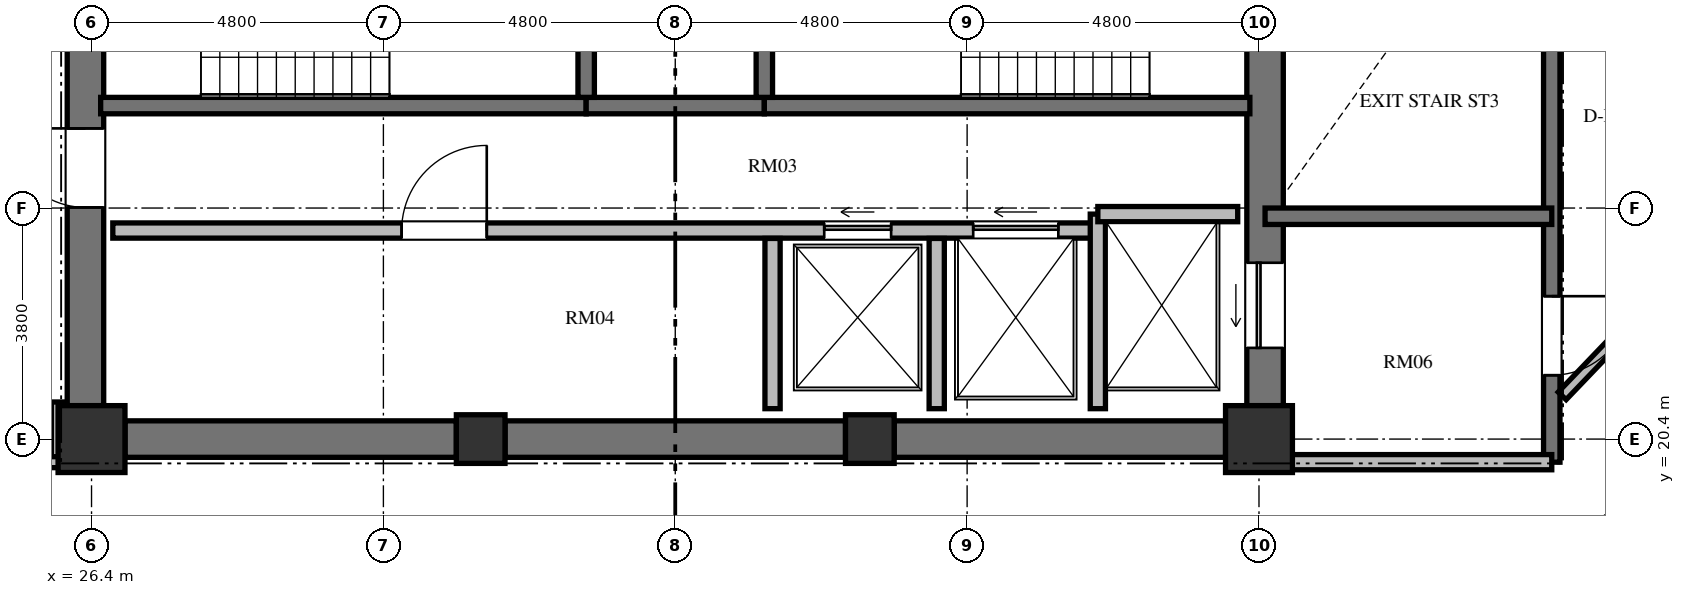
"""IFC4 building model, lengths in metres.
Left out: names, types, materials, properties, quantities, classifications, styles, units other than length and angle.
Written with IfcOpenShell. Run it as: python <this file> out.ifc"""

import sys

from ifc_helpers import new_model, si_unit, direction, frame, frame_2d, origin, origin_2d, place, context, subcontext, project, spatial, rectangle, extrude, element, fill, save


model = new_model("IFC4")
c1 = context("Model", 3, precision=1e-05, world=origin(), true_north=direction((0.0, 1.0)))
c2 = subcontext(c1, "Body", "Model", "MODEL_VIEW")
j1 = project(units=[si_unit("LENGTHUNIT", "METRE"), si_unit("PLANEANGLEUNIT", "RADIAN")], contexts=[c1])
p1 = place(None, origin())
s1 = spatial("IfcSite", under=j1, at=p1, CompositionType="ELEMENT")
p2 = place(p1, origin())
s2 = spatial("IfcBuilding", under=s1, at=p2, CompositionType="ELEMENT")
p3 = place(p2, frame((0.0, 0.0, 194.832)))
s3 = spatial("IfcBuildingStorey", under=s2, at=p3, CompositionType="ELEMENT", Elevation=194.832)
p4 = place(p3, frame((26.4, 20.4, 0.0), z_axis=(0.0, 0.0, 1.0), x_axis=(1.0, 0.0, 0.0)))
e1 = element("IfcColumn", 1, at=p4, inside=s3, PredefinedType="COLUMN", context=c2, shape_type="SweptSolid", body=[
    extrude(rectangle(XDim=1.1, YDim=1.1, at=origin_2d()), origin(), (0.0, 0.0, 1.0), 3.648),
])
for number, where, z_axis, x_axis in (
    (2, (32.8, 20.4, 0.0), (0.0, 0.0, 1.0), (1.0, 0.0, 0.0)),
    (3, (39.2, 20.4, 0.0), (0.0, 0.0, 1.0), (1.0, 0.0, 0.0)),
):
    element("IfcColumn", number, at=place(p3, frame(where, z_axis=z_axis, x_axis=x_axis)), inside=s3, PredefinedType="COLUMN", context=c2, shape_type="SweptSolid", body=[
        extrude(rectangle(XDim=0.8, YDim=0.8, at=origin_2d()), origin(), (0.0, 0.0, 1.0), 3.648),
    ])
p5 = place(p3, frame((45.6, 20.4, 0.0), z_axis=(0.0, 0.0, 1.0), x_axis=(1.0, 0.0, 0.0)))
e4 = element("IfcColumn", 4, at=p5, inside=s3, PredefinedType="COLUMN", context=c2, shape_type="SweptSolid", body=[
    extrude(rectangle(XDim=1.1, YDim=1.1, at=origin_2d()), origin(), (0.0, 0.0, 1.0), 3.648),
])
p6 = place(p3, frame((26.3, 20.95, 0.0), z_axis=(0.0, 0.0, 1.0), x_axis=(0.0, 1.0, 0.0)))
e5 = element("IfcWall", 5, at=p6, inside=s3, PredefinedType="SHEAR", context=c2, shape_type="SweptSolid", body=[
    extrude(rectangle(XDim=14.1, YDim=0.6, at=frame_2d((7.05, 0.0))), origin(), (0.0, 0.0, 1.0), 3.648),
])
p7 = place(p6, frame((6.5, 0.0, 0.0)))
e6 = element("IfcOpeningElement", 6, at=p7, cuts=e5, PredefinedType="OPENING", context=c2, shape_type="SweptSolid", body=[
    extrude(rectangle(XDim=1.2, YDim=2.15, at=frame_2d((0.6, 1.075))), frame((0.0, 0.31, 0.0), z_axis=(0.0, -1.0, 0.0), x_axis=(1.0, 0.0, 0.0)), (0.0, 0.0, 1.0), 0.62),
])
p8 = place(p6, frame((9.6, 0.0, 0.0)))
e7 = element("IfcOpeningElement", 7, at=p8, cuts=e5, PredefinedType="OPENING", context=c2, shape_type="SweptSolid", body=[
    extrude(rectangle(XDim=1.3, YDim=2.2, at=frame_2d((0.65, 1.1))), frame((0.0, 0.31, 0.0), z_axis=(0.0, -1.0, 0.0), x_axis=(1.0, 0.0, 0.0)), (0.0, 0.0, 1.0), 0.62),
])
p9 = place(p6, frame((3.26, 0.0, 0.0)))
e8 = element("IfcOpeningElement", 8, at=p9, cuts=e5, PredefinedType="OPENING", context=c2, shape_type="SweptSolid", body=[
    extrude(rectangle(XDim=1.3, YDim=2.2, at=frame_2d((0.65, 1.1))), frame((0.0, 0.31, 0.0), z_axis=(0.0, -1.0, 0.0), x_axis=(1.0, 0.0, 0.0)), (0.0, 0.0, 1.0), 0.62),
])
p10 = place(p3, frame((45.7, 20.95, 0.0), z_axis=(0.0, 0.0, 1.0), x_axis=(0.0, 1.0, 0.0)))
e9 = element("IfcWall", 9, at=p10, inside=s3, PredefinedType="SHEAR", context=c2, shape_type="SweptSolid", body=[
    extrude(rectangle(XDim=14.1, YDim=0.6, at=frame_2d((7.05, 0.0))), origin(), (0.0, 0.0, 1.0), 3.648),
])
p11 = place(p10, frame((11.75, 0.0, 0.0)))
e10 = element("IfcOpeningElement", 10, at=p11, cuts=e9, PredefinedType="OPENING", context=c2, shape_type="SweptSolid", body=[
    extrude(rectangle(XDim=1.4, YDim=2.3, at=frame_2d((0.7, 1.15))), frame((0.0, 0.31, 0.0), z_axis=(0.0, -1.0, 0.0), x_axis=(1.0, 0.0, 0.0)), (0.0, 0.0, 1.0), 0.62),
])
p12 = place(p10, frame((0.95, 0.0, 0.0)))
e11 = element("IfcOpeningElement", 11, at=p12, cuts=e9, PredefinedType="OPENING", context=c2, shape_type="SweptSolid", body=[
    extrude(rectangle(XDim=1.4, YDim=2.3, at=frame_2d((0.7, 1.15))), frame((0.0, 0.31, 0.0), z_axis=(0.0, -1.0, 0.0), x_axis=(1.0, 0.0, 0.0)), (0.0, 0.0, 1.0), 0.62),
])
p13 = place(p3, frame((26.95, 20.4, 0.0), z_axis=(0.0, 0.0, 1.0), x_axis=(1.0, 0.0, 0.0)))
e12 = element("IfcWall", 12, at=p13, inside=s3, PredefinedType="SHEAR", context=c2, shape_type="SweptSolid", body=[
    extrude(rectangle(XDim=5.45, YDim=0.6, at=frame_2d((2.725, 0.0))), origin(), (0.0, 0.0, 1.0), 3.648),
])
p14 = place(p3, frame((33.2, 20.4, 0.0), z_axis=(0.0, 0.0, 1.0), x_axis=(1.0, 0.0, 0.0)))
e13 = element("IfcWall", 13, at=p14, inside=s3, PredefinedType="SHEAR", context=c2, shape_type="SweptSolid", body=[
    extrude(rectangle(XDim=5.6, YDim=0.6, at=frame_2d((2.8, 0.0))), origin(), (0.0, 0.0, 1.0), 3.648),
])
p15 = place(p3, frame((39.6, 20.4, 0.0), z_axis=(0.0, 0.0, 1.0), x_axis=(1.0, 0.0, 0.0)))
e14 = element("IfcWall", 14, at=p15, inside=s3, PredefinedType="SHEAR", context=c2, shape_type="SweptSolid", body=[
    extrude(rectangle(XDim=5.45, YDim=0.6, at=frame_2d((2.725, 0.0))), origin(), (0.0, 0.0, 1.0), 3.648),
])
p16 = place(p3, frame((26.55, 25.885, 0.0), z_axis=(0.0, 0.0, 1.0), x_axis=(1.0, 0.0, 0.0)))
e15 = element("IfcWall", 15, at=p16, inside=s3, PredefinedType="SHEAR", context=c2, shape_type="SweptSolid", body=[
    extrude(rectangle(XDim=7.985, YDim=0.27, at=frame_2d((3.992, 0.0))), origin(), (0.0, 0.0, 1.0), 3.648),
])
p17 = place(p3, frame((34.535, 25.885, 0.0), z_axis=(0.0, 0.0, 1.0), x_axis=(1.0, 0.0, 0.0)))
e16 = element("IfcWall", 16, at=p17, inside=s3, PredefinedType="SHEAR", context=c2, shape_type="SweptSolid", body=[
    extrude(rectangle(XDim=2.93, YDim=0.27, at=frame_2d((1.465, 0.0))), origin(), (0.0, 0.0, 1.0), 3.648),
])
p18 = place(p3, frame((37.465, 25.885, 0.0), z_axis=(0.0, 0.0, 1.0), x_axis=(1.0, 0.0, 0.0)))
e17 = element("IfcWall", 17, at=p18, inside=s3, PredefinedType="SHEAR", context=c2, shape_type="SweptSolid", body=[
    extrude(rectangle(XDim=7.985, YDim=0.27, at=frame_2d((3.992, 0.0))), origin(), (0.0, 0.0, 1.0), 3.648),
])
for number, where, z_axis, x_axis in (
    (18, (34.535, 26.02, 0.0), (0.0, 0.0, 1.0), (0.0, 1.0, 0.0)),
    (19, (37.465, 26.02, 0.0), (0.0, 0.0, 1.0), (0.0, 1.0, 0.0)),
):
    element("IfcWall", number, at=place(p3, frame(where, z_axis=z_axis, x_axis=x_axis)), inside=s3, PredefinedType="SHEAR", context=c2, shape_type="SweptSolid", body=[
        extrude(rectangle(XDim=4.08, YDim=0.27, at=frame_2d((2.04, 0.0))), origin(), (0.0, 0.0, 1.0), 3.648),
    ])
p19 = place(p3, frame((26.75, 23.83, 0.0), z_axis=(0.0, 0.0, 1.0), x_axis=(1.0, 0.0, 0.0)))
e20 = element("IfcWall", 20, at=p19, inside=s3, PredefinedType="SOLIDWALL", context=c2, shape_type="SweptSolid", body=[
    extrude(rectangle(XDim=16.2, YDim=0.25, at=frame_2d((8.1, 0.0))), origin(), (0.0, 0.0, 1.0), 3.448),
])
p20 = place(p19, frame((4.75, 0.0, 0.0)))
e21 = element("IfcOpeningElement", 21, at=p20, cuts=e20, PredefinedType="OPENING", context=c2, shape_type="SweptSolid", body=[
    extrude(rectangle(XDim=1.4, YDim=2.2, at=frame_2d((0.7, 1.1))), frame((0.0, 0.135, 0.0), z_axis=(0.0, -1.0, 0.0), x_axis=(1.0, 0.0, 0.0)), (0.0, 0.0, 1.0), 0.27),
])
p21 = place(p19, frame((11.7, 0.0, 0.0)))
e22 = element("IfcOpeningElement", 22, at=p21, cuts=e20, PredefinedType="OPENING", context=c2, shape_type="SweptSolid", body=[
    extrude(rectangle(XDim=1.1, YDim=2.2, at=frame_2d((0.55, 1.1))), frame((0.0, 0.135, 0.0), z_axis=(0.0, -1.0, 0.0), x_axis=(1.0, 0.0, 0.0)), (0.0, 0.0, 1.0), 0.27),
])
p22 = place(p19, frame((14.15, 0.0, 0.0)))
e23 = element("IfcOpeningElement", 23, at=p22, cuts=e20, PredefinedType="OPENING", context=c2, shape_type="SweptSolid", body=[
    extrude(rectangle(XDim=1.4, YDim=2.3, at=frame_2d((0.7, 1.15))), frame((0.0, 0.135, 0.0), z_axis=(0.0, -1.0, 0.0), x_axis=(1.0, 0.0, 0.0)), (0.0, 0.0, 1.0), 0.27),
])
p23 = place(p3, frame((42.95, 20.9, 0.0), z_axis=(0.0, 0.0, 1.0), x_axis=(0.0, 1.0, 0.0)))
e24 = element("IfcWall", 24, at=p23, inside=s3, PredefinedType="SOLIDWALL", context=c2, shape_type="SweptSolid", body=[
    extrude(rectangle(XDim=3.2, YDim=0.25, at=frame_2d((1.6, 0.0))), origin(), (0.0, 0.0, 1.0), 3.448),
])
p24 = place(p3, frame((42.95, 24.1, 0.0), z_axis=(0.0, 0.0, 1.0), x_axis=(1.0, 0.0, 0.0)))
e25 = element("IfcWall", 25, at=p24, inside=s3, PredefinedType="SOLIDWALL", context=c2, shape_type="SweptSolid", body=[
    extrude(rectangle(XDim=2.3, YDim=0.25, at=frame_2d((1.15, 0.0))), origin(), (0.0, 0.0, 1.0), 3.448),
])
for number, where, z_axis, x_axis in (
    (26, (37.6, 20.9, 0.0), (0.0, 0.0, 1.0), (0.0, 1.0, 0.0)),
    (27, (40.3, 20.9, 0.0), (0.0, 0.0, 1.0), (0.0, 1.0, 0.0)),
):
    element("IfcWall", number, at=place(p3, frame(where, z_axis=z_axis, x_axis=x_axis)), inside=s3, PredefinedType="SOLIDWALL", context=c2, shape_type="SweptSolid", body=[
        extrude(rectangle(XDim=2.8, YDim=0.25, at=frame_2d((1.4, 0.0))), origin(), (0.0, 0.0, 1.0), 3.448),
    ])
p25 = place(p3, frame((50.415, 35.845, 0.0), z_axis=(0.0, 0.0, 1.0), x_axis=(0.0, -1.0, 0.0)))
e28 = element("IfcWall", 28, at=p25, inside=s3, PredefinedType="SHEAR", context=c2, shape_type="SweptSolid", body=[
    extrude(rectangle(XDim=15.825, YDim=0.27, at=frame_2d((7.913, 0.0))), origin(), (0.0, 0.0, 1.0), 3.648),
])
p26 = place(p25, frame((4.445, 0.0, 0.0)))
e29 = element("IfcOpeningElement", 29, at=p26, cuts=e28, PredefinedType="OPENING", context=c2, shape_type="SweptSolid", body=[
    extrude(rectangle(XDim=1.2, YDim=2.15, at=frame_2d((0.6, 1.075))), frame((0.0, 0.145, 0.0), z_axis=(0.0, -1.0, 0.0), x_axis=(1.0, 0.0, 0.0)), (0.0, 0.0, 1.0), 0.29),
])
p27 = place(p25, frame((1.295, 0.0, 0.0)))
e30 = element("IfcOpeningElement", 30, at=p27, cuts=e28, PredefinedType="OPENING", context=c2, shape_type="SweptSolid", body=[
    extrude(rectangle(XDim=1.3, YDim=2.2, at=frame_2d((0.65, 1.1))), frame((0.0, 0.145, 0.0), z_axis=(0.0, -1.0, 0.0), x_axis=(1.0, 0.0, 0.0)), (0.0, 0.0, 1.0), 0.29),
])
p28 = place(p25, frame((13.095, 0.0, 0.0)))
e31 = element("IfcOpeningElement", 31, at=p28, cuts=e28, PredefinedType="OPENING", context=c2, shape_type="SweptSolid", body=[
    extrude(rectangle(XDim=1.3, YDim=2.2, at=frame_2d((0.65, 1.1))), frame((0.0, 0.145, 0.0), z_axis=(0.0, -1.0, 0.0), x_axis=(1.0, 0.0, 0.0)), (0.0, 0.0, 1.0), 0.29),
])
p29 = place(p3, frame((45.7, 24.065, 0.0), z_axis=(0.0, 0.0, 1.0), x_axis=(1.0, 0.0, 0.0)))
e32 = element("IfcWall", 32, at=p29, inside=s3, PredefinedType="SHEAR", context=c2, shape_type="SweptSolid", body=[
    extrude(rectangle(XDim=4.715, YDim=0.27, at=frame_2d((2.357, 0.0))), origin(), (0.0, 0.0, 1.0), 3.648),
])
p30 = place(p3, frame((45.7, 20.02, 0.0), z_axis=(0.0, 0.0, 1.0), x_axis=(1.0, 0.0, 0.0)))
e33 = element("IfcWall", 33, at=p30, inside=s3, PredefinedType="SOLIDWALL", context=c2, shape_type="SweptSolid", body=[
    extrude(rectangle(XDim=4.715, YDim=0.25, at=frame_2d((2.357, 0.0))), origin(), (0.0, 0.0, 1.0), 3.448),
])
p31 = place(p3, frame((53.078, 23.714, 0.0), z_axis=(0.0, 0.0, 1.0), x_axis=(-0.691353379446, -0.722516785085, 0.0)))
e34 = element("IfcWall", 34, at=p31, inside=s3, PredefinedType="PARTITIONING", context=c2, shape_type="SweptSolid", body=[
    extrude(rectangle(XDim=3.604, YDim=0.18, at=frame_2d((1.802, 0.0))), origin(), (0.0, 0.0, 1.0), 3.448),
])
p32 = place(p3, frame((25.83, 21.01, 0.0), z_axis=(0.0, 0.0, 1.0), x_axis=(0.0, -1.0, 0.0)))
e35 = element("IfcWall", 35, at=p32, inside=s3, PredefinedType="PARTITIONING", context=c2, shape_type="SweptSolid", body=[
    extrude(rectangle(XDim=1.03, YDim=0.18, at=frame_2d((0.515, 0.0))), origin(), (0.0, 0.0, 1.0), 3.448),
])
p33 = place(p3, frame((25.87, 20.02, 0.0), z_axis=(0.0, 0.0, 1.0), x_axis=(-1.0, 0.0, 0.0)))
e36 = element("IfcWall", 36, at=p33, inside=s3, PredefinedType="PARTITIONING", context=c2, shape_type="SweptSolid", body=[
    extrude(rectangle(XDim=2.56, YDim=0.18, at=frame_2d((1.28, 0.0))), origin(), (0.0, 0.0, 1.0), 3.448),
])
p34 = place(p9, origin())
e37 = element("IfcDoor", 37, at=p34, inside=s3, OperationType="SINGLE_SWING_RIGHT", PredefinedType="DOOR", context=c2, shape_type="SweptSolid", body=[
    extrude(rectangle(XDim=1.3, YDim=2.2, at=frame_2d((0.65, 1.1))), frame((0.0, 0.025, 0.0), z_axis=(0.0, -1.0, 0.0), x_axis=(1.0, 0.0, 0.0)), (0.0, 0.0, 1.0), 0.05),
])
fill(e8, e37)
p35 = place(p20, origin())
e38 = element("IfcDoor", 38, at=p35, inside=s3, OperationType="SINGLE_SWING_RIGHT", PredefinedType="DOOR", context=c2, shape_type="SweptSolid", body=[
    extrude(rectangle(XDim=1.4, YDim=2.2, at=frame_2d((0.7, 1.1))), frame((0.0, 0.025, 0.0), z_axis=(0.0, -1.0, 0.0), x_axis=(1.0, 0.0, 0.0)), (0.0, 0.0, 1.0), 0.05),
])
fill(e21, e38)
p36 = place(p21, origin())
e39 = element("IfcDoor", 39, at=p36, inside=s3, OperationType="SLIDING_TO_LEFT", PredefinedType="DOOR", context=c2, shape_type="SweptSolid", body=[
    extrude(rectangle(XDim=1.1, YDim=2.2, at=frame_2d((0.55, 1.1))), frame((0.0, 0.025, 0.0), z_axis=(0.0, -1.0, 0.0), x_axis=(1.0, 0.0, 0.0)), (0.0, 0.0, 1.0), 0.05),
])
fill(e22, e39)
p37 = place(p12, origin())
e40 = element("IfcDoor", 40, at=p37, inside=s3, OperationType="SLIDING_TO_LEFT", PredefinedType="DOOR", context=c2, shape_type="SweptSolid", body=[
    extrude(rectangle(XDim=1.4, YDim=2.3, at=frame_2d((0.7, 1.15))), frame((0.0, 0.025, 0.0), z_axis=(0.0, -1.0, 0.0), x_axis=(1.0, 0.0, 0.0)), (0.0, 0.0, 1.0), 0.05),
])
fill(e11, e40)
p38 = place(p22, origin())
e41 = element("IfcDoor", 41, at=p38, inside=s3, OperationType="SLIDING_TO_LEFT", PredefinedType="DOOR", context=c2, shape_type="SweptSolid", body=[
    extrude(rectangle(XDim=1.4, YDim=2.3, at=frame_2d((0.7, 1.15))), frame((0.0, 0.025, 0.0), z_axis=(0.0, -1.0, 0.0), x_axis=(1.0, 0.0, 0.0)), (0.0, 0.0, 1.0), 0.05),
])
fill(e23, e41)
p39 = place(p28, origin())
e42 = element("IfcDoor", 42, at=p39, inside=s3, OperationType="SINGLE_SWING_LEFT", PredefinedType="DOOR", context=c2, shape_type="SweptSolid", body=[
    extrude(rectangle(XDim=1.3, YDim=2.2, at=frame_2d((0.65, 1.1))), frame((0.0, 0.025, 0.0), z_axis=(0.0, -1.0, 0.0), x_axis=(1.0, 0.0, 0.0)), (0.0, 0.0, 1.0), 0.05),
])
fill(e31, e42)
save(model, sys.argv[1])
